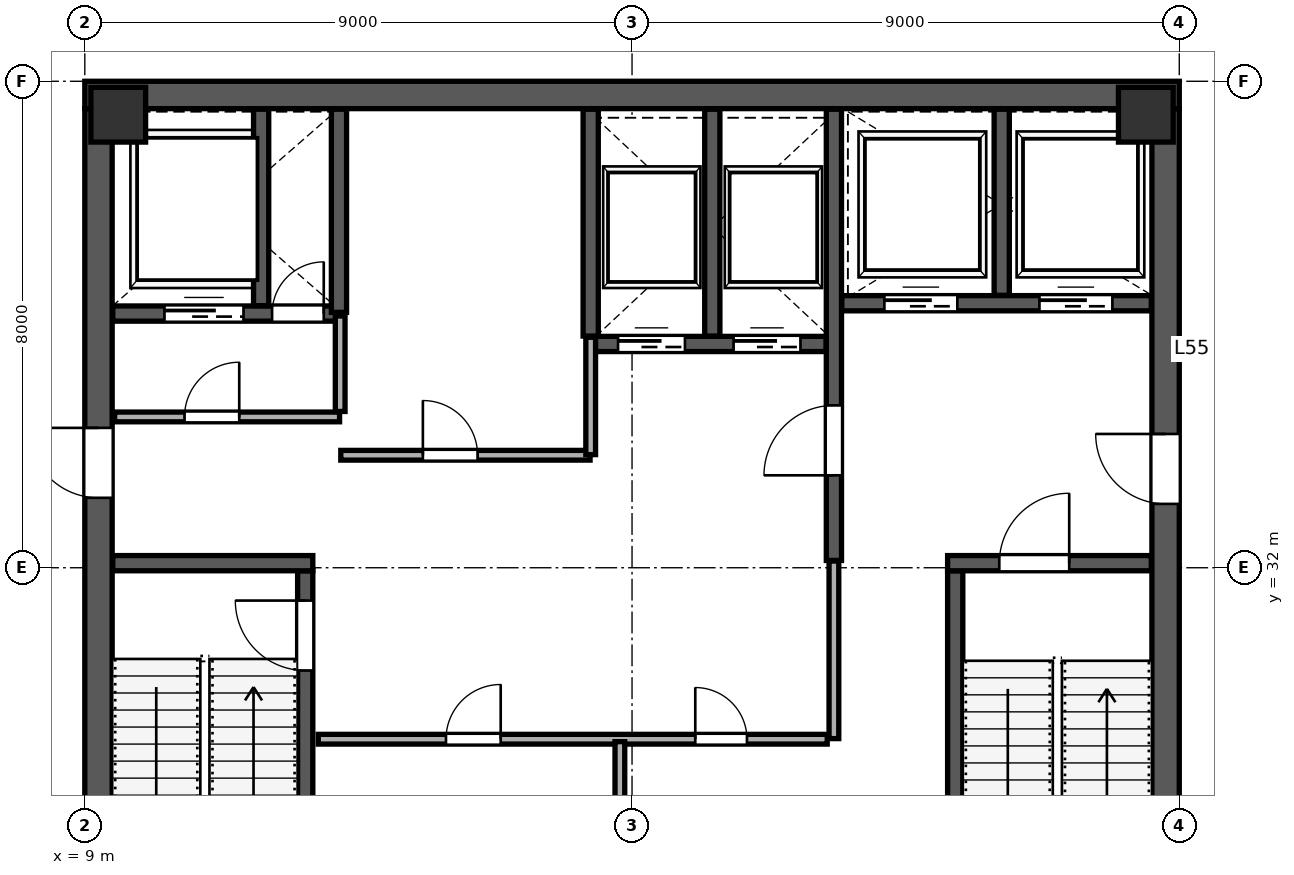
"""IFC4 building model, lengths in metres.
Left out: names, types, materials, properties, quantities, classifications, styles, units other than length and angle.
Written with IfcOpenShell. Run it as: python <this file> out.ifc"""

import sys

from ifc_helpers import new_model, si_unit, direction, frame, frame_2d, origin, origin_2d, place, context, subcontext, project, spatial, rectangle, extrude, source, transform, mapped, element, fill, save


model = new_model("IFC4")
c1 = context("Model", 3, precision=1e-05, world=origin(), true_north=direction((0.0, 1.0)))
c2 = subcontext(c1, "Body", "Model", "MODEL_VIEW")
j1 = project(units=[si_unit("LENGTHUNIT", "METRE"), si_unit("PLANEANGLEUNIT", "RADIAN")], contexts=[c1])
p1 = place(None, origin())
s1 = spatial("IfcSite", under=j1, at=p1, CompositionType="ELEMENT")
p2 = place(p1, origin())
s2 = spatial("IfcBuilding", under=s1, at=p2, CompositionType="ELEMENT")
p3 = place(p2, frame((0.0, 0.0, 245.8)))
s3 = spatial("IfcBuildingStorey", under=s2, at=p3, CompositionType="ELEMENT", Elevation=245.8)
m1 = source(origin(), c2, "Body", "SweptSolid", [
    extrude(rectangle(XDim=0.9, YDim=0.9, at=origin_2d()), origin(), (0.0, 0.0, 1.0), 4.198),
])
for number, where, z_axis, x_axis in (
    (1, (9.55, 39.45, 0.001), (0.0, 0.0, 1.0), (1.0, 0.0, 0.0)),
    (2, (26.45, 39.45, 0.001), (0.0, 0.0, 1.0), (1.0, 0.0, 0.0)),
):
    element("IfcColumn", number, at=place(p3, frame(where, z_axis=z_axis, x_axis=x_axis)), inside=s3, PredefinedType="COLUMN", context=c2, shape_type="MappedRepresentation", body=[
        mapped(m1, transform((0.0, 0.0, 0.0), scale=1.0)),
    ])
p4 = place(p3, frame((9.225, 24.45, 0.0), z_axis=(0.0, 0.0, 1.0), x_axis=(0.0, 1.0, 0.0)))
e3 = element("IfcWall", 3, at=p4, inside=s3, PredefinedType="SHEAR", context=c2, shape_type="SweptSolid", body=[
    extrude(rectangle(XDim=15.1, YDim=0.45, at=frame_2d((7.55, 0.0))), origin(), (0.0, 0.0, 1.0), 3.96),
])
p5 = place(p4, frame((8.7, 0.0, 0.0)))
e4 = element("IfcOpeningElement", 4, at=p5, cuts=e3, PredefinedType="OPENING", context=c2, shape_type="SweptSolid", body=[
    extrude(rectangle(XDim=1.15, YDim=2.2, at=frame_2d((0.575, 1.1))), frame((0.0, 0.235, 0.0), z_axis=(0.0, -1.0, 0.0), x_axis=(1.0, 0.0, 0.0)), (0.0, 0.0, 1.0), 0.47),
])
p6 = place(p3, frame((26.775, 24.45, 0.0), z_axis=(0.0, 0.0, 1.0), x_axis=(0.0, 1.0, 0.0)))
e5 = element("IfcWall", 5, at=p6, inside=s3, PredefinedType="SHEAR", context=c2, shape_type="SweptSolid", body=[
    extrude(rectangle(XDim=15.1, YDim=0.45, at=frame_2d((7.55, 0.0))), origin(), (0.0, 0.0, 1.0), 3.96),
])
p7 = place(p6, frame((8.6, 0.0, 0.0)))
e6 = element("IfcOpeningElement", 6, at=p7, cuts=e5, PredefinedType="OPENING", context=c2, shape_type="SweptSolid", body=[
    extrude(rectangle(XDim=1.15, YDim=2.2, at=frame_2d((0.575, 1.1))), frame((0.0, 0.235, 0.0), z_axis=(0.0, -1.0, 0.0), x_axis=(1.0, 0.0, 0.0)), (0.0, 0.0, 1.0), 0.47),
])
p8 = place(p3, frame((9.0, 39.775, 0.0), z_axis=(0.0, 0.0, 1.0), x_axis=(1.0, 0.0, 0.0)))
e7 = element("IfcWall", 7, at=p8, inside=s3, PredefinedType="SHEAR", context=c2, shape_type="SweptSolid", body=[
    extrude(rectangle(XDim=18.0, YDim=0.45, at=frame_2d((9.0, 0.0))), origin(), (0.0, 0.0, 1.0), 3.96),
])
p9 = place(p3, frame((12.625, 24.46, 0.0), z_axis=(0.0, 0.0, 1.0), x_axis=(0.0, 1.0, 0.0)))
e8 = element("IfcWall", 8, at=p9, inside=s3, PredefinedType="SHEAR", context=c2, shape_type="SweptSolid", body=[
    extrude(rectangle(XDim=7.49, YDim=0.25, at=frame_2d((3.745, 0.0))), origin(), (0.0, 0.0, 1.0), 3.96),
])
p10 = place(p9, frame((5.85, 0.0, 0.0)))
e9 = element("IfcOpeningElement", 9, at=p10, cuts=e8, PredefinedType="OPENING", context=c2, shape_type="SweptSolid", body=[
    extrude(rectangle(XDim=1.15, YDim=2.2, at=frame_2d((0.575, 1.1))), frame((0.0, 0.135, 0.0), z_axis=(0.0, -1.0, 0.0), x_axis=(1.0, 0.0, 0.0)), (0.0, 0.0, 1.0), 0.27),
])
p11 = place(p3, frame((9.46, 32.075, 0.0), z_axis=(0.0, 0.0, 1.0), x_axis=(1.0, 0.0, 0.0)))
e10 = element("IfcWall", 10, at=p11, inside=s3, PredefinedType="SHEAR", context=c2, shape_type="SweptSolid", body=[
    extrude(rectangle(XDim=3.29, YDim=0.25, at=frame_2d((1.645, 0.0))), origin(), (0.0, 0.0, 1.0), 3.96),
])
p12 = place(p3, frame((23.315, 24.46, 0.0), z_axis=(0.0, 0.0, 1.0), x_axis=(0.0, 1.0, 0.0)))
e11 = element("IfcWall", 11, at=p12, inside=s3, PredefinedType="SHEAR", context=c2, shape_type="SweptSolid", body=[
    extrude(rectangle(XDim=7.49, YDim=0.25, at=frame_2d((3.745, 0.0))), origin(), (0.0, 0.0, 1.0), 3.96),
])
p13 = place(p3, frame((23.19, 32.075, 0.0), z_axis=(0.0, 0.0, 1.0), x_axis=(1.0, 0.0, 0.0)))
e12 = element("IfcWall", 12, at=p13, inside=s3, PredefinedType="SHEAR", context=c2, shape_type="SweptSolid", body=[
    extrude(rectangle(XDim=3.35, YDim=0.25, at=frame_2d((1.675, 0.0))), origin(), (0.0, 0.0, 1.0), 3.96),
])
p14 = place(p13, frame((0.85, 0.0, 0.0)))
e13 = element("IfcOpeningElement", 13, at=p14, cuts=e12, PredefinedType="OPENING", context=c2, shape_type="SweptSolid", body=[
    extrude(rectangle(XDim=1.15, YDim=2.2, at=frame_2d((0.575, 1.1))), frame((0.0, 0.135, 0.0), z_axis=(0.0, -1.0, 0.0), x_axis=(1.0, 0.0, 0.0)), (0.0, 0.0, 1.0), 0.27),
])
p15 = place(p3, frame((21.32, 32.12, 0.0), z_axis=(0.0, 0.0, 1.0), x_axis=(0.0, 1.0, 0.0)))
e14 = element("IfcWall", 14, at=p15, inside=s3, PredefinedType="SHEAR", context=c2, shape_type="SweptSolid", body=[
    extrude(rectangle(XDim=7.42, YDim=0.25, at=frame_2d((3.71, 0.0))), origin(), (0.0, 0.0, 1.0), 3.96),
])
p16 = place(p15, frame((1.4, 0.0, 0.0)))
e15 = element("IfcOpeningElement", 15, at=p16, cuts=e14, PredefinedType="OPENING", context=c2, shape_type="SweptSolid", body=[
    extrude(rectangle(XDim=1.15, YDim=2.2, at=frame_2d((0.575, 1.1))), frame((0.0, 0.135, 0.0), z_axis=(0.0, -1.0, 0.0), x_axis=(1.0, 0.0, 0.0)), (0.0, 0.0, 1.0), 0.27),
])
p17 = place(p3, frame((9.46, 36.18, 0.0), z_axis=(0.0, 0.0, 1.0), x_axis=(1.0, 0.0, 0.0)))
e16 = element("IfcWall", 16, at=p17, inside=s3, PredefinedType="SHEAR", context=c2, shape_type="SweptSolid", body=[
    extrude(rectangle(XDim=3.79, YDim=0.25, at=frame_2d((1.895, 0.0))), origin(), (0.0, 0.0, 1.0), 3.96),
])
p18 = place(p17, frame((2.62, 0.0, 0.0)))
e17 = element("IfcOpeningElement", 17, at=p18, cuts=e16, PredefinedType="OPENING", context=c2, shape_type="SweptSolid", body=[
    extrude(rectangle(XDim=0.85, YDim=2.1, at=frame_2d((0.425, 1.05))), frame((0.0, 0.135, 0.0), z_axis=(0.0, -1.0, 0.0), x_axis=(1.0, 0.0, 0.0)), (0.0, 0.0, 1.0), 0.27),
])
p19 = place(p17, frame((0.85, 0.0, 0.0)))
e18 = element("IfcOpeningElement", 18, at=p19, cuts=e16, PredefinedType="OPENING", context=c2, shape_type="SweptSolid", body=[
    extrude(rectangle(XDim=1.3, YDim=2.25, at=frame_2d((0.65, 1.125))), frame((0.0, 0.135, 0.0), z_axis=(0.0, -1.0, 0.0), x_axis=(1.0, 0.0, 0.0)), (0.0, 0.0, 1.0), 0.27),
])
p20 = place(p3, frame((11.9, 36.31, 0.0), z_axis=(0.0, 0.0, 1.0), x_axis=(0.0, 1.0, 0.0)))
e19 = element("IfcWall", 19, at=p20, inside=s3, PredefinedType="SHEAR", context=c2, shape_type="SweptSolid", body=[
    extrude(rectangle(XDim=3.23, YDim=0.25, at=frame_2d((1.615, 0.0))), origin(), (0.0, 0.0, 1.0), 3.96),
])
p21 = place(p3, frame((21.45, 36.35, 0.0), z_axis=(0.0, 0.0, 1.0), x_axis=(1.0, 0.0, 0.0)))
e20 = element("IfcWall", 20, at=p21, inside=s3, PredefinedType="SHEAR", context=c2, shape_type="SweptSolid", body=[
    extrude(rectangle(XDim=5.09, YDim=0.25, at=frame_2d((2.545, 0.0))), origin(), (0.0, 0.0, 1.0), 3.96),
])
p22 = place(p21, frame((0.7, 0.0, 0.0)))
e21 = element("IfcOpeningElement", 21, at=p22, cuts=e20, PredefinedType="OPENING", context=c2, shape_type="SweptSolid", body=[
    extrude(rectangle(XDim=1.2, YDim=2.2, at=frame_2d((0.6, 1.1))), frame((0.0, 0.135, 0.0), z_axis=(0.0, -1.0, 0.0), x_axis=(1.0, 0.0, 0.0)), (0.0, 0.0, 1.0), 0.27),
])
p23 = place(p21, frame((3.25, 0.0, 0.0)))
e22 = element("IfcOpeningElement", 22, at=p23, cuts=e20, PredefinedType="OPENING", context=c2, shape_type="SweptSolid", body=[
    extrude(rectangle(XDim=1.2, YDim=2.2, at=frame_2d((0.6, 1.1))), frame((0.0, 0.135, 0.0), z_axis=(0.0, -1.0, 0.0), x_axis=(1.0, 0.0, 0.0)), (0.0, 0.0, 1.0), 0.27),
])
p24 = place(p3, frame((24.08, 36.48, 0.0), z_axis=(0.0, 0.0, 1.0), x_axis=(0.0, 1.0, 0.0)))
e23 = element("IfcWall", 23, at=p24, inside=s3, PredefinedType="SHEAR", context=c2, shape_type="SweptSolid", body=[
    extrude(rectangle(XDim=3.06, YDim=0.25, at=frame_2d((1.53, 0.0))), origin(), (0.0, 0.0, 1.0), 3.96),
])
p25 = place(p3, frame((13.18, 36.2, 0.0), z_axis=(0.0, 0.0, 1.0), x_axis=(0.0, 1.0, 0.0)))
e24 = element("IfcWall", 24, at=p25, inside=s3, PredefinedType="SHEAR", context=c2, shape_type="SweptSolid", body=[
    extrude(rectangle(XDim=3.34, YDim=0.25, at=frame_2d((1.67, 0.0))), origin(), (0.0, 0.0, 1.0), 3.96),
])
p26 = place(p3, frame((17.32, 35.68, 0.0), z_axis=(0.0, 0.0, 1.0), x_axis=(1.0, 0.0, 0.0)))
e25 = element("IfcWall", 25, at=p26, inside=s3, PredefinedType="SHEAR", context=c2, shape_type="SweptSolid", body=[
    extrude(rectangle(XDim=3.87, YDim=0.25, at=frame_2d((1.935, 0.0))), origin(), (0.0, 0.0, 1.0), 3.96),
])
p27 = place(p26, frame((0.45, 0.0, 0.0)))
e26 = element("IfcOpeningElement", 26, at=p27, cuts=e25, PredefinedType="OPENING", context=c2, shape_type="SweptSolid", body=[
    extrude(rectangle(XDim=1.1, YDim=2.2, at=frame_2d((0.55, 1.1))), frame((0.0, 0.135, 0.0), z_axis=(0.0, -1.0, 0.0), x_axis=(1.0, 0.0, 0.0)), (0.0, 0.0, 1.0), 0.27),
])
p28 = place(p26, frame((2.35, 0.0, 0.0)))
e27 = element("IfcOpeningElement", 27, at=p28, cuts=e25, PredefinedType="OPENING", context=c2, shape_type="SweptSolid", body=[
    extrude(rectangle(XDim=1.1, YDim=2.2, at=frame_2d((0.55, 1.1))), frame((0.0, 0.135, 0.0), z_axis=(0.0, -1.0, 0.0), x_axis=(1.0, 0.0, 0.0)), (0.0, 0.0, 1.0), 0.27),
])
for number, where, z_axis, x_axis in (
    (28, (17.32, 35.81, 0.0), (0.0, 0.0, 1.0), (0.0, 1.0, 0.0)),
    (29, (19.32, 35.81, 0.0), (0.0, 0.0, 1.0), (0.0, 1.0, 0.0)),
):
    element("IfcWall", number, at=place(p3, frame(where, z_axis=z_axis, x_axis=x_axis)), inside=s3, PredefinedType="SHEAR", context=c2, shape_type="SweptSolid", body=[
        extrude(rectangle(XDim=3.73, YDim=0.25, at=frame_2d((1.865, 0.0))), origin(), (0.0, 0.0, 1.0), 3.96),
    ])
p29 = place(p3, frame((9.49, 34.48, 0.0), z_axis=(0.0, 0.0, 1.0), x_axis=(1.0, 0.0, 0.0)))
e30 = element("IfcWall", 30, at=p29, inside=s3, PredefinedType="PARTITIONING", context=c2, shape_type="SweptSolid", body=[
    extrude(rectangle(XDim=3.7, YDim=0.16, at=frame_2d((1.85, 0.0))), origin(), (0.0, 0.0, 1.0), 3.96),
])
p30 = place(p29, frame((1.15, 0.0, 0.0)))
e31 = element("IfcOpeningElement", 31, at=p30, cuts=e30, PredefinedType="OPENING", context=c2, shape_type="SweptSolid", body=[
    extrude(rectangle(XDim=0.9, YDim=2.15, at=frame_2d((0.45, 1.075))), frame((0.0, 0.09, 0.0), z_axis=(0.0, -1.0, 0.0), x_axis=(1.0, 0.0, 0.0)), (0.0, 0.0, 1.0), 0.18),
])
p31 = place(p3, frame((13.2, 34.57, 0.0), z_axis=(0.0, 0.0, 1.0), x_axis=(0.0, 1.0, 0.0)))
e32 = element("IfcWall", 32, at=p31, inside=s3, PredefinedType="PARTITIONING", context=c2, shape_type="SweptSolid", body=[
    extrude(rectangle(XDim=1.57, YDim=0.16, at=frame_2d((0.785, 0.0))), origin(), (0.0, 0.0, 1.0), 3.96),
])
p32 = place(p3, frame((13.21, 33.85, 0.0), z_axis=(0.0, 0.0, 1.0), x_axis=(1.0, 0.0, 0.0)))
e33 = element("IfcWall", 33, at=p32, inside=s3, PredefinedType="PARTITIONING", context=c2, shape_type="SweptSolid", body=[
    extrude(rectangle(XDim=4.1, YDim=0.16, at=frame_2d((2.05, 0.0))), origin(), (0.0, 0.0, 1.0), 3.96),
])
p33 = place(p32, frame((1.35, 0.0, 0.0)))
e34 = element("IfcOpeningElement", 34, at=p33, cuts=e33, PredefinedType="OPENING", context=c2, shape_type="SweptSolid", body=[
    extrude(rectangle(XDim=0.9, YDim=2.15, at=frame_2d((0.45, 1.075))), frame((0.0, 0.09, 0.0), z_axis=(0.0, -1.0, 0.0), x_axis=(1.0, 0.0, 0.0)), (0.0, 0.0, 1.0), 0.18),
])
p34 = place(p3, frame((17.32, 33.86, 0.0), z_axis=(0.0, 0.0, 1.0), x_axis=(0.0, 1.0, 0.0)))
e35 = element("IfcWall", 35, at=p34, inside=s3, PredefinedType="PARTITIONING", context=c2, shape_type="SweptSolid", body=[
    extrude(rectangle(XDim=1.93, YDim=0.16, at=frame_2d((0.965, 0.0))), origin(), (0.0, 0.0, 1.0), 3.96),
])
p35 = place(p3, frame((12.84, 29.18, 0.0), z_axis=(0.0, 0.0, 1.0), x_axis=(1.0, 0.0, 0.0)))
e36 = element("IfcWall", 36, at=p35, inside=s3, PredefinedType="PARTITIONING", context=c2, shape_type="SweptSolid", body=[
    extrude(rectangle(XDim=8.37, YDim=0.16, at=frame_2d((4.185, 0.0))), origin(), (0.0, 0.0, 1.0), 3.96),
])
p36 = place(p35, frame((2.1, 0.0, 0.0)))
e37 = element("IfcOpeningElement", 37, at=p36, cuts=e36, PredefinedType="OPENING", context=c2, shape_type="SweptSolid", body=[
    extrude(rectangle(XDim=0.9, YDim=2.15, at=frame_2d((0.45, 1.075))), frame((0.0, 0.09, 0.0), z_axis=(0.0, -1.0, 0.0), x_axis=(1.0, 0.0, 0.0)), (0.0, 0.0, 1.0), 0.18),
])
p37 = place(p35, frame((6.2, 0.0, 0.0)))
e38 = element("IfcOpeningElement", 38, at=p37, cuts=e36, PredefinedType="OPENING", context=c2, shape_type="SweptSolid", body=[
    extrude(rectangle(XDim=0.85, YDim=2.1, at=frame_2d((0.425, 1.05))), frame((0.0, 0.09, 0.0), z_axis=(0.0, -1.0, 0.0), x_axis=(1.0, 0.0, 0.0)), (0.0, 0.0, 1.0), 0.18),
])
p38 = place(p3, frame((17.8, 24.54, 0.0), z_axis=(0.0, 0.0, 1.0), x_axis=(0.0, 1.0, 0.0)))
e39 = element("IfcWall", 39, at=p38, inside=s3, PredefinedType="PARTITIONING", context=c2, shape_type="SweptSolid", body=[
    extrude(rectangle(XDim=4.6, YDim=0.16, at=frame_2d((2.3, 0.0))), origin(), (0.0, 0.0, 1.0), 3.96),
])
p39 = place(p3, frame((21.32, 29.19, 0.0), z_axis=(0.0, 0.0, 1.0), x_axis=(0.0, 1.0, 0.0)))
e40 = element("IfcWall", 40, at=p39, inside=s3, PredefinedType="PARTITIONING", context=c2, shape_type="SweptSolid", body=[
    extrude(rectangle(XDim=2.92, YDim=0.16, at=frame_2d((1.46, 0.0))), origin(), (0.0, 0.0, 1.0), 3.96),
])
p40 = place(p3, frame((17.993, 51.134, 0.0), z_axis=(0.0, 0.0, 1.0), x_axis=(0.707106781187, -0.707106781187, 0.0)))
e41 = element("IfcWall", 41, at=p40, inside=s3, PredefinedType="PARTITIONING", context=c2, shape_type="SweptSolid", body=[
    extrude(rectangle(XDim=22.27, YDim=0.1, at=frame_2d((11.135, 0.0))), origin(), (0.0, 0.0, 1.0), 3.96),
])
p41 = place(p40, frame((10.8, 0.0, 0.0)))
e42 = element("IfcOpeningElement", 42, at=p41, cuts=e41, PredefinedType="OPENING", context=c2, shape_type="SweptSolid", body=[
    extrude(rectangle(XDim=0.95, YDim=2.15, at=frame_2d((0.475, 1.075))), frame((0.0, 0.06, 0.0), z_axis=(0.0, -1.0, 0.0), x_axis=(1.0, 0.0, 0.0)), (0.0, 0.0, 1.0), 0.12),
])
p42 = place(p3, frame((0.775, 33.973, 0.0), z_axis=(0.0, 0.0, 1.0), x_axis=(0.707106781187, 0.707106781187, 0.0)))
e43 = element("IfcWall", 43, at=p42, inside=s3, PredefinedType="PARTITIONING", context=c2, shape_type="SweptSolid", body=[
    extrude(rectangle(XDim=29.28, YDim=0.115, at=frame_2d((14.64, 0.0))), origin(), (0.0, 0.0, 1.0), 3.96),
])
p43 = place(p42, frame((2.6, 0.0, 0.0)))
e44 = element("IfcOpeningElement", 44, at=p43, cuts=e43, PredefinedType="OPENING", context=c2, shape_type="SweptSolid", body=[
    extrude(rectangle(XDim=0.95, YDim=2.15, at=frame_2d((0.475, 1.075))), frame((0.0, 0.067, 0.0), z_axis=(0.0, -1.0, 0.0), x_axis=(1.0, 0.0, 0.0)), (0.0, 0.0, 1.0), 0.135),
])
m2 = source(origin(), c2, "Body", "SweptSolid", [
    extrude(rectangle(XDim=1.15, YDim=2.2, at=frame_2d((0.575, 1.1))), frame((0.0, 0.025, 0.0), z_axis=(0.0, -1.0, 0.0), x_axis=(1.0, 0.0, 0.0)), (0.0, 0.0, 1.0), 0.05),
])
p44 = place(p10, origin())
e45 = element("IfcDoor", 45, at=p44, inside=s3, OperationType="SINGLE_SWING_RIGHT", PredefinedType="DOOR", context=c2, shape_type="MappedRepresentation", body=[
    mapped(m2, transform((0.0, 0.0, 0.0), scale=1.0)),
])
fill(e9, e45)
m3 = source(origin(), c2, "Body", "SweptSolid", [
    extrude(rectangle(XDim=1.15, YDim=2.2, at=frame_2d((0.575, 1.1))), frame((0.0, 0.025, 0.0), z_axis=(0.0, -1.0, 0.0), x_axis=(1.0, 0.0, 0.0)), (0.0, 0.0, 1.0), 0.05),
])
p45 = place(p16, origin())
e46 = element("IfcDoor", 46, at=p45, inside=s3, OperationType="SINGLE_SWING_LEFT", PredefinedType="DOOR", context=c2, shape_type="MappedRepresentation", body=[
    mapped(m3, transform((0.0, 0.0, 0.0), scale=1.0)),
])
fill(e15, e46)
p46 = place(p14, origin())
e47 = element("IfcDoor", 47, at=p46, inside=s3, OperationType="SINGLE_SWING_RIGHT", PredefinedType="DOOR", context=c2, shape_type="MappedRepresentation", body=[
    mapped(m2, transform((0.0, 0.0, 0.0), scale=1.0)),
])
fill(e13, e47)
p47 = place(p7, origin())
e48 = element("IfcDoor", 48, at=p47, inside=s3, OperationType="SINGLE_SWING_RIGHT", PredefinedType="DOOR", context=c2, shape_type="MappedRepresentation", body=[
    mapped(m3, transform((0.0, 0.0, 0.0), scale=1.0)),
])
fill(e6, e48)
p48 = place(p5, origin())
e49 = element("IfcDoor", 49, at=p48, inside=s3, OperationType="SINGLE_SWING_RIGHT", PredefinedType="DOOR", context=c2, shape_type="MappedRepresentation", body=[
    mapped(m3, transform((0.0, 0.0, 0.0), scale=1.0)),
])
fill(e4, e49)
m4 = source(origin(), c2, "Body", "SweptSolid", [
    extrude(rectangle(XDim=0.85, YDim=2.1, at=frame_2d((0.425, 1.05))), frame((0.0, 0.025, 0.0), z_axis=(0.0, -1.0, 0.0), x_axis=(1.0, 0.0, 0.0)), (0.0, 0.0, 1.0), 0.05),
])
p49 = place(p18, origin())
e50 = element("IfcDoor", 50, at=p49, inside=s3, OperationType="SINGLE_SWING_RIGHT", PredefinedType="DOOR", context=c2, shape_type="MappedRepresentation", body=[
    mapped(m4, transform((0.0, 0.0, 0.0), scale=1.0)),
])
fill(e17, e50)
m5 = source(origin(), c2, "Body", "SweptSolid", [
    extrude(rectangle(XDim=1.1, YDim=2.2, at=frame_2d((0.55, 1.1))), frame((0.0, 0.025, 0.0), z_axis=(0.0, -1.0, 0.0), x_axis=(1.0, 0.0, 0.0)), (0.0, 0.0, 1.0), 0.05),
])
p50 = place(p27, origin())
e51 = element("IfcDoor", 51, at=p50, inside=s3, OperationType="SLIDING_TO_LEFT", PredefinedType="DOOR", context=c2, shape_type="MappedRepresentation", body=[
    mapped(m5, transform((0.0, 0.0, 0.0), scale=1.0)),
])
fill(e26, e51)
p51 = place(p28, origin())
e52 = element("IfcDoor", 52, at=p51, inside=s3, OperationType="SLIDING_TO_RIGHT", PredefinedType="DOOR", context=c2, shape_type="MappedRepresentation", body=[
    mapped(m5, transform((0.0, 0.0, 0.0), scale=1.0)),
])
fill(e27, e52)
m6 = source(origin(), c2, "Body", "SweptSolid", [
    extrude(rectangle(XDim=1.2, YDim=2.2, at=frame_2d((0.6, 1.1))), frame((0.0, 0.025, 0.0), z_axis=(0.0, -1.0, 0.0), x_axis=(1.0, 0.0, 0.0)), (0.0, 0.0, 1.0), 0.05),
])
p52 = place(p22, origin())
e53 = element("IfcDoor", 53, at=p52, inside=s3, OperationType="SLIDING_TO_LEFT", PredefinedType="DOOR", context=c2, shape_type="MappedRepresentation", body=[
    mapped(m6, transform((0.0, 0.0, 0.0), scale=1.0)),
])
fill(e21, e53)
p53 = place(p23, origin())
e54 = element("IfcDoor", 54, at=p53, inside=s3, OperationType="SLIDING_TO_RIGHT", PredefinedType="DOOR", context=c2, shape_type="MappedRepresentation", body=[
    mapped(m6, transform((0.0, 0.0, 0.0), scale=1.0)),
])
fill(e22, e54)
m7 = source(origin(), c2, "Body", "SweptSolid", [
    extrude(rectangle(XDim=1.3, YDim=2.25, at=frame_2d((0.65, 1.125))), frame((0.0, 0.025, 0.0), z_axis=(0.0, -1.0, 0.0), x_axis=(1.0, 0.0, 0.0)), (0.0, 0.0, 1.0), 0.05),
])
p54 = place(p19, origin())
e55 = element("IfcDoor", 55, at=p54, inside=s3, OperationType="SLIDING_TO_LEFT", PredefinedType="DOOR", context=c2, shape_type="MappedRepresentation", body=[
    mapped(m7, transform((0.0, 0.0, 0.0), scale=1.0)),
])
fill(e18, e55)
m8 = source(origin(), c2, "Body", "SweptSolid", [
    extrude(rectangle(XDim=0.9, YDim=2.15, at=frame_2d((0.45, 1.075))), frame((0.0, 0.025, 0.0), z_axis=(0.0, -1.0, 0.0), x_axis=(1.0, 0.0, 0.0)), (0.0, 0.0, 1.0), 0.05),
])
p55 = place(p30, origin())
e56 = element("IfcDoor", 56, at=p55, inside=s3, OperationType="SINGLE_SWING_RIGHT", PredefinedType="DOOR", context=c2, shape_type="MappedRepresentation", body=[
    mapped(m8, transform((0.0, 0.0, 0.0), scale=1.0)),
])
fill(e31, e56)
p56 = place(p33, origin())
e57 = element("IfcDoor", 57, at=p56, inside=s3, OperationType="SINGLE_SWING_LEFT", PredefinedType="DOOR", context=c2, shape_type="MappedRepresentation", body=[
    mapped(m8, transform((0.0, 0.0, 0.0), scale=1.0)),
])
fill(e34, e57)
p57 = place(p36, origin())
e58 = element("IfcDoor", 58, at=p57, inside=s3, OperationType="SINGLE_SWING_RIGHT", PredefinedType="DOOR", context=c2, shape_type="MappedRepresentation", body=[
    mapped(m8, transform((0.0, 0.0, 0.0), scale=1.0)),
])
fill(e37, e58)
p58 = place(p37, origin())
e59 = element("IfcDoor", 59, at=p58, inside=s3, OperationType="SINGLE_SWING_LEFT", PredefinedType="DOOR", context=c2, shape_type="MappedRepresentation", body=[
    mapped(m4, transform((0.0, 0.0, 0.0), scale=1.0)),
])
fill(e38, e59)
save(model, sys.argv[1])
